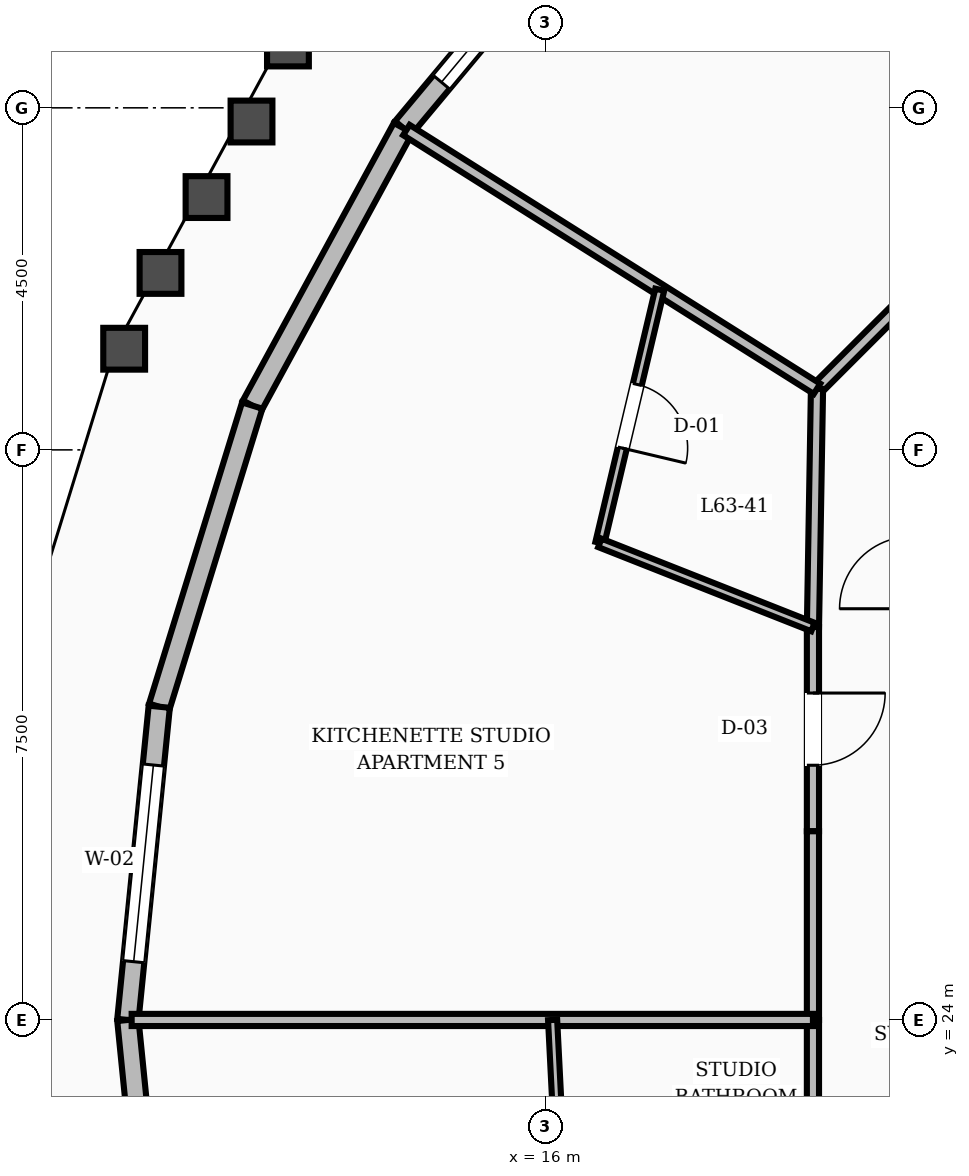
"""IFC4 building model, lengths in metres.
Left out: names, types, materials, properties, quantities, classifications, styles, units other than length and angle.
Written with IfcOpenShell. Run it as: python <this file> out.ifc"""

import sys

from ifc_helpers import new_model, si_unit, direction, frame, frame_2d, origin, place, context, subcontext, project, spatial, rectangle, extrude, element, fill, save


model = new_model("IFC4")
c1 = context("Model", 3, precision=1e-05, world=origin(), true_north=direction((0.0, 1.0)))
c2 = subcontext(c1, "Body", "Model", "MODEL_VIEW")
j1 = project(units=[si_unit("LENGTHUNIT", "METRE"), si_unit("PLANEANGLEUNIT", "RADIAN")], contexts=[c1])
p1 = place(None, origin())
s1 = spatial("IfcSite", under=j1, at=p1, CompositionType="ELEMENT")
p2 = place(p1, origin())
s2 = spatial("IfcBuilding", under=s1, at=p2, CompositionType="ELEMENT")
p3 = place(p2, frame((0.0, 0.0, 243.6)))
s3 = spatial("IfcBuildingStorey", under=s2, at=p3, CompositionType="ELEMENT", Elevation=243.6)
p4 = place(p3, frame((16.802, 38.935, 0.0), z_axis=(0.0, 0.0, 1.0), x_axis=(-0.64097876836, -0.767558609171, 0.0)))
e1 = element("IfcWall", 1, at=p4, inside=s3, PredefinedType="STANDARD", context=c2, shape_type="SweptSolid", body=[
    extrude(rectangle(XDim=4.17, YDim=0.28, at=frame_2d((2.085, 0.0))), origin(), (0.0, 0.0, 1.0), 2.88),
])
p5 = place(p4, frame((0.785, 0.0, 0.8)))
e2 = element("IfcOpeningElement", 2, at=p5, cuts=e1, PredefinedType="OPENING", context=c2, shape_type="SweptSolid", body=[
    extrude(rectangle(XDim=2.6, YDim=1.65, at=frame_2d((1.3, 0.825))), frame((0.0, 0.15, 0.0), z_axis=(0.0, -1.0, 0.0), x_axis=(1.0, 0.0, 0.0)), (0.0, 0.0, 1.0), 0.3),
])
p6 = place(p3, frame((14.129, 35.735, 0.0), z_axis=(0.0, 0.0, 1.0), x_axis=(-0.477839535555, -0.878447140277, 0.0)))
e3 = element("IfcWall", 3, at=p6, inside=s3, PredefinedType="STANDARD", context=c2, shape_type="SweptSolid", body=[
    extrude(rectangle(XDim=4.157, YDim=0.28, at=frame_2d((2.079, 0.0))), origin(), (0.0, 0.0, 1.0), 2.88),
])
p7 = place(p3, frame((12.143, 32.083, 0.0), z_axis=(0.0, 0.0, 1.0), x_axis=(-0.294900751468, -0.955527889066, 0.0)))
e4 = element("IfcWall", 4, at=p7, inside=s3, PredefinedType="STANDARD", context=c2, shape_type="SweptSolid", body=[
    extrude(rectangle(XDim=4.147, YDim=0.28, at=frame_2d((2.073, 0.0))), origin(), (0.0, 0.0, 1.0), 2.88),
])
p8 = place(p3, frame((10.92, 28.121, 0.0), z_axis=(0.0, 0.0, 1.0), x_axis=(-0.099748868054, -0.995012644805, 0.0)))
e5 = element("IfcWall", 5, at=p8, inside=s3, PredefinedType="STANDARD", context=c2, shape_type="SweptSolid", body=[
    extrude(rectangle(XDim=4.141, YDim=0.28, at=frame_2d((2.071, 0.0))), origin(), (0.0, 0.0, 1.0), 2.88),
])
p9 = place(p8, frame((0.771, 0.0, 0.8)))
e6 = element("IfcOpeningElement", 6, at=p9, cuts=e5, PredefinedType="OPENING", context=c2, shape_type="SweptSolid", body=[
    extrude(rectangle(XDim=2.6, YDim=1.65, at=frame_2d((1.3, 0.825))), frame((0.0, 0.15, 0.0), z_axis=(0.0, -1.0, 0.0), x_axis=(1.0, 0.0, 0.0)), (0.0, 0.0, 1.0), 0.3),
])
p10 = place(p3, frame((10.507, 24.0, 0.0), z_axis=(0.0, 0.0, 1.0), x_axis=(0.099748868054, -0.995012644805, 0.0)))
e7 = element("IfcWall", 7, at=p10, inside=s3, PredefinedType="STANDARD", context=c2, shape_type="SweptSolid", body=[
    extrude(rectangle(XDim=4.141, YDim=0.28, at=frame_2d((2.071, 0.0))), origin(), (0.0, 0.0, 1.0), 2.88),
])
p11 = place(p3, frame((21.635, 34.365, 0.0), z_axis=(0.0, 0.0, 1.0), x_axis=(-0.707106781187, -0.707106781187, 0.0)))
e8 = element("IfcWall", 8, at=p11, inside=s3, PredefinedType="SOLIDWALL", context=c2, shape_type="SweptSolid", body=[
    extrude(rectangle(XDim=2.916, YDim=0.16, at=frame_2d((1.458, 0.0))), origin(), (0.0, 0.0, 1.0), 2.87),
])
p12 = place(p3, frame((19.573, 32.303, 0.0), z_axis=(0.0, 0.0, 1.0), x_axis=(-0.016981035134, -0.999855811828, 0.0)))
e9 = element("IfcWall", 9, at=p12, inside=s3, PredefinedType="SOLIDWALL", context=c2, shape_type="SweptSolid", body=[
    extrude(rectangle(XDim=3.134, YDim=0.16, at=frame_2d((1.567, 0.0))), origin(), (0.0, 0.0, 1.0), 2.87),
])
p13 = place(p3, frame((19.52, 29.169, 0.0), z_axis=(0.0, 0.0, 1.0), x_axis=(0.0, -1.0, 0.0)))
e10 = element("IfcWall", 10, at=p13, inside=s3, PredefinedType="SOLIDWALL", context=c2, shape_type="SweptSolid", body=[
    extrude(rectangle(XDim=2.687, YDim=0.16, at=frame_2d((1.344, 0.0))), origin(), (0.0, 0.0, 1.0), 2.87),
])
p14 = place(p13, frame((0.868, 0.0, 0.0)))
e11 = element("IfcOpeningElement", 11, at=p14, cuts=e10, PredefinedType="OPENING", context=c2, shape_type="SweptSolid", body=[
    extrude(rectangle(XDim=0.95, YDim=2.1, at=frame_2d((0.475, 1.05))), frame((0.0, 0.09, 0.0), z_axis=(0.0, -1.0, 0.0), x_axis=(1.0, 0.0, 0.0)), (0.0, 0.0, 1.0), 0.18),
])
for number, where, z_axis, x_axis in (
    (12, (19.52, 26.482, 0.0), (0.0, 0.0, 1.0), (0.0, -1.0, 0.0)),
    (13, (19.52, 24.0, 0.0), (0.0, 0.0, 1.0), (0.0, -1.0, 0.0)),
):
    element("IfcWall", number, at=place(p3, frame(where, z_axis=z_axis, x_axis=x_axis)), inside=s3, PredefinedType="SOLIDWALL", context=c2, shape_type="SweptSolid", body=[
        extrude(rectangle(XDim=2.482, YDim=0.16, at=frame_2d((1.241, 0.0))), origin(), (0.0, 0.0, 1.0), 2.87),
    ])
p15 = place(p3, frame((19.573, 32.303, 0.0), z_axis=(0.0, 0.0, 1.0), x_axis=(-0.845977345185, 0.533218840096, 0.0)))
e14 = element("IfcWall", 14, at=p15, inside=s3, PredefinedType="SOLIDWALL", context=c2, shape_type="SweptSolid", body=[
    extrude(rectangle(XDim=6.385, YDim=0.16, at=frame_2d((3.193, 0.0))), origin(), (0.0, 0.0, 1.0), 2.87),
])
p16 = place(p3, frame((17.504, 33.607, 0.0), z_axis=(0.0, 0.0, 1.0), x_axis=(-0.230128636875, -0.973160218304, 0.0)))
e15 = element("IfcWall", 15, at=p16, inside=s3, PredefinedType="PARTITIONING", context=c2, shape_type="SweptSolid", body=[
    extrude(rectangle(XDim=3.422, YDim=0.12, at=frame_2d((1.711, 0.0))), origin(), (0.0, 0.0, 1.0), 2.87),
])
p17 = place(p16, frame((1.281, 0.0, 0.0)))
e16 = element("IfcOpeningElement", 16, at=p17, cuts=e15, PredefinedType="OPENING", context=c2, shape_type="SweptSolid", body=[
    extrude(rectangle(XDim=0.86, YDim=2.1, at=frame_2d((0.43, 1.05))), frame((0.0, 0.07, 0.0), z_axis=(0.0, -1.0, 0.0), x_axis=(1.0, 0.0, 0.0)), (0.0, 0.0, 1.0), 0.14),
])
p18 = place(p3, frame((19.52, 29.169, 0.0), z_axis=(0.0, 0.0, 1.0), x_axis=(-0.930082401802, 0.367350957339, 0.0)))
e17 = element("IfcWall", 17, at=p18, inside=s3, PredefinedType="PARTITIONING", context=c2, shape_type="SweptSolid", body=[
    extrude(rectangle(XDim=3.014, YDim=0.12, at=frame_2d((1.507, 0.0))), origin(), (0.0, 0.0, 1.0), 2.87),
])
p19 = place(p3, frame((19.52, 24.0, 0.0), z_axis=(0.0, 0.0, 1.0), x_axis=(-1.0, 0.0, 0.0)))
e18 = element("IfcWall", 18, at=p19, inside=s3, PredefinedType="SOLIDWALL", context=c2, shape_type="SweptSolid", body=[
    extrude(rectangle(XDim=8.963, YDim=0.16, at=frame_2d((4.481, 0.0))), origin(), (0.0, 0.0, 1.0), 2.87),
])
p20 = place(p3, frame((16.095, 24.0, 0.0), z_axis=(0.0, 0.0, 1.0), x_axis=(0.050493770541, -0.99872437596, 0.0)))
e19 = element("IfcWall", 19, at=p20, inside=s3, PredefinedType="PARTITIONING", context=c2, shape_type="SweptSolid", body=[
    extrude(rectangle(XDim=3.109, YDim=0.12, at=frame_2d((1.554, 0.0))), origin(), (0.0, 0.0, 1.0), 2.87),
])
p21 = place(p20, frame((1.125, 0.0, 0.0)))
e20 = element("IfcOpeningElement", 20, at=p21, cuts=e19, PredefinedType="OPENING", context=c2, shape_type="SweptSolid", body=[
    extrude(rectangle(XDim=0.86, YDim=2.1, at=frame_2d((0.43, 1.05))), frame((0.0, 0.07, 0.0), z_axis=(0.0, -1.0, 0.0), x_axis=(1.0, 0.0, 0.0)), (0.0, 0.0, 1.0), 0.14),
])
p22 = place(p5, origin())
e21 = element("IfcWindow", 21, at=p22, inside=s3, PartitioningType="SINGLE_PANEL", PredefinedType="WINDOW", context=c2, shape_type="SweptSolid", body=[
    extrude(rectangle(XDim=2.6, YDim=1.65, at=frame_2d((1.3, 0.825))), frame((0.0, 0.03, 0.0), z_axis=(0.0, -1.0, 0.0), x_axis=(1.0, 0.0, 0.0)), (0.0, 0.0, 1.0), 0.06),
])
fill(e2, e21)
p23 = place(p9, origin())
e22 = element("IfcWindow", 22, at=p23, inside=s3, PartitioningType="SINGLE_PANEL", PredefinedType="WINDOW", context=c2, shape_type="SweptSolid", body=[
    extrude(rectangle(XDim=2.6, YDim=1.65, at=frame_2d((1.3, 0.825))), frame((0.0, 0.03, 0.0), z_axis=(0.0, -1.0, 0.0), x_axis=(1.0, 0.0, 0.0)), (0.0, 0.0, 1.0), 0.06),
])
fill(e6, e22)
p24 = place(p17, origin())
e23 = element("IfcDoor", 23, at=p24, inside=s3, OperationType="SINGLE_SWING_RIGHT", PredefinedType="DOOR", context=c2, shape_type="SweptSolid", body=[
    extrude(rectangle(XDim=0.86, YDim=2.1, at=frame_2d((0.43, 1.05))), frame((0.0, 0.025, 0.0), z_axis=(0.0, -1.0, 0.0), x_axis=(1.0, 0.0, 0.0)), (0.0, 0.0, 1.0), 0.05),
])
fill(e16, e23)
p25 = place(p14, origin())
e24 = element("IfcDoor", 24, at=p25, inside=s3, OperationType="SINGLE_SWING_LEFT", PredefinedType="DOOR", context=c2, shape_type="SweptSolid", body=[
    extrude(rectangle(XDim=0.95, YDim=2.1, at=frame_2d((0.475, 1.05))), frame((0.0, 0.025, 0.0), z_axis=(0.0, -1.0, 0.0), x_axis=(1.0, 0.0, 0.0)), (0.0, 0.0, 1.0), 0.05),
])
fill(e11, e24)
save(model, sys.argv[1])
